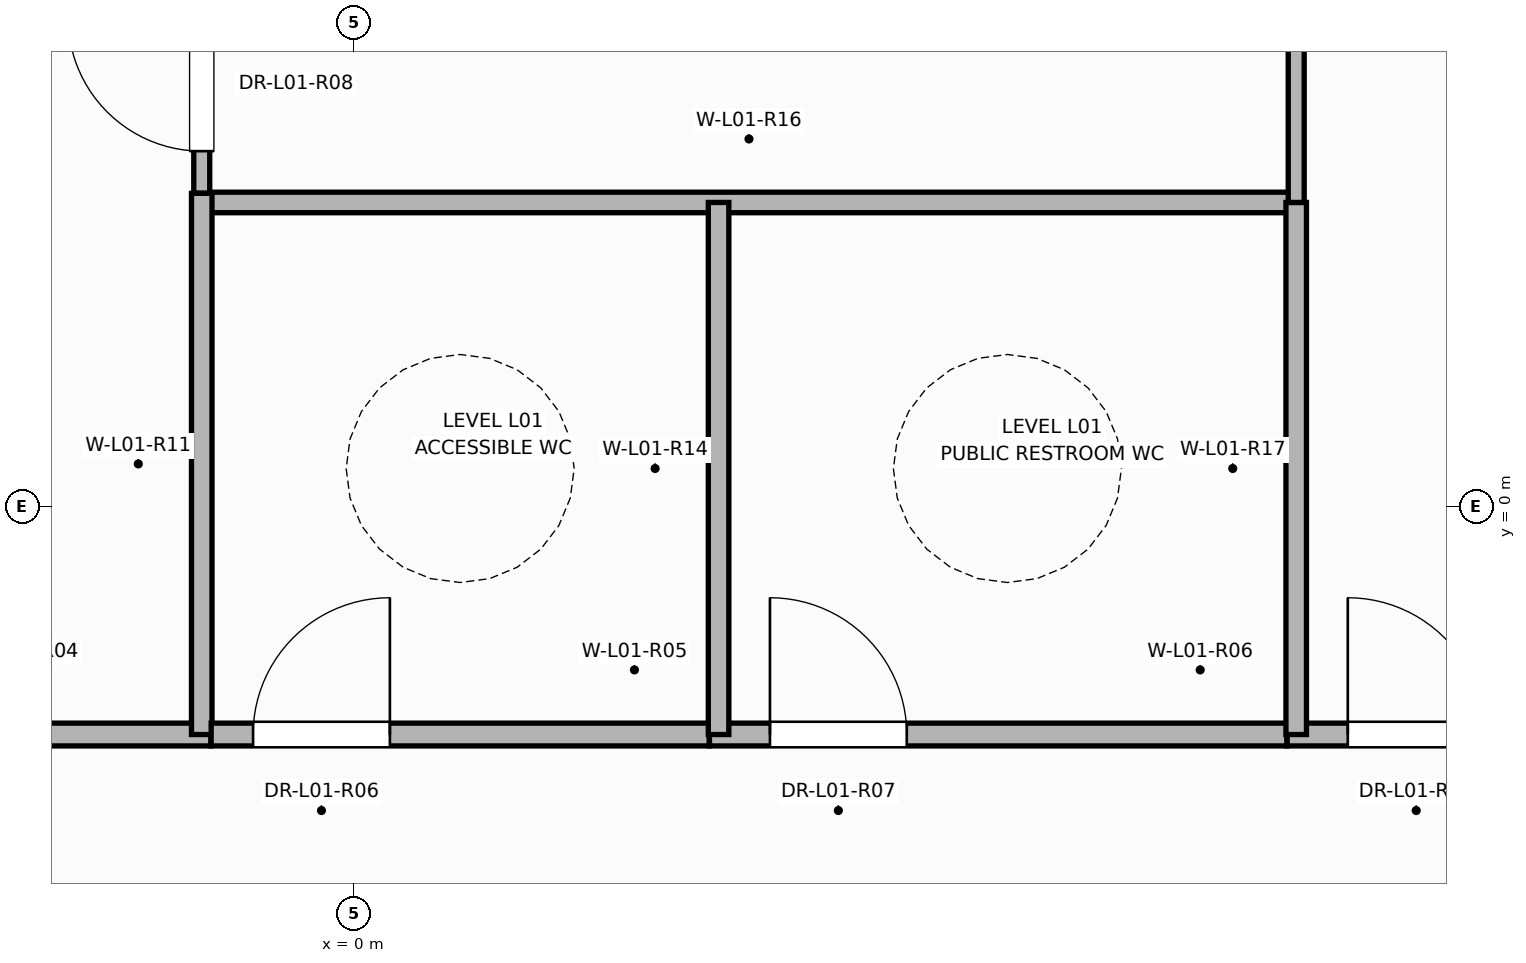
"""IFC4 building model, lengths in metres.
Left out: names, types, materials, properties, quantities, classifications, styles, units other than length and angle.
Written with IfcOpenShell. Run it as: python <this file> out.ifc"""

import sys

from ifc_helpers import new_model, si_unit, direction, frame, frame_2d, origin, place, context, subcontext, project, spatial, rectangle, extrude, element, fill, save


model = new_model("IFC4")
c1 = context("Model", 3, precision=1e-05, world=origin(), true_north=direction((0.0, 1.0)))
c2 = subcontext(c1, "Body", "Model", "MODEL_VIEW")
j1 = project(units=[si_unit("LENGTHUNIT", "METRE"), si_unit("PLANEANGLEUNIT", "RADIAN")], contexts=[c1])
p1 = place(None, origin())
s1 = spatial("IfcSite", under=j1, at=p1, CompositionType="ELEMENT")
p2 = place(p1, origin())
s2 = spatial("IfcBuilding", under=s1, at=p2, CompositionType="ELEMENT")
p3 = place(p2, frame((0.0, 0.0, 5.4)))
s3 = spatial("IfcBuildingStorey", under=s2, at=p3, CompositionType="ELEMENT", Elevation=5.4)
p4 = place(p3, frame((6.14, -1.5, 0.0), z_axis=(0.0, 0.0, 1.0), x_axis=(1.0, 0.0, 0.0)))
e1 = element("IfcWall", 1, at=p4, inside=s3, PredefinedType="PARTITIONING", context=c2, shape_type="SweptSolid", body=[
    extrude(rectangle(XDim=10.177, YDim=0.15, at=frame_2d((5.088, 0.0))), origin(), (0.0, 0.0, 1.0), 4.068),
])
p5 = place(p4, frame((0.399, 0.0, 0.0)))
e2 = element("IfcOpeningElement", 2, at=p5, cuts=e1, PredefinedType="OPENING", context=c2, shape_type="SweptSolid", body=[
    extrude(rectangle(XDim=0.906, YDim=2.104, at=frame_2d((0.45, 1.052))), frame((0.0, 0.085, 0.0), z_axis=(0.0, -1.0, 0.0), x_axis=(1.0, 0.0, 0.0)), (0.0, 0.0, 1.0), 0.17),
])
p6 = place(p3, frame((-9.06, -1.5, 0.0), z_axis=(0.0, 0.0, 1.0), x_axis=(1.0, 0.0, 0.0)))
e3 = element("IfcWall", 3, at=p6, inside=s3, PredefinedType="PARTITIONING", context=c2, shape_type="SweptSolid", body=[
    extrude(rectangle(XDim=8.12, YDim=0.15, at=frame_2d((4.06, 0.0))), origin(), (0.0, 0.0, 1.0), 4.22),
])
p7 = place(p6, frame((0.399, 0.0, 0.0)))
e4 = element("IfcOpeningElement", 4, at=p7, cuts=e3, PredefinedType="OPENING", context=c2, shape_type="SweptSolid", body=[
    extrude(rectangle(XDim=0.906, YDim=2.104, at=frame_2d((0.45, 1.052))), frame((0.0, 0.085, 0.0), z_axis=(0.0, -1.0, 0.0), x_axis=(1.0, 0.0, 0.0)), (0.0, 0.0, 1.0), 0.17),
])
p8 = place(p3, frame((2.34, -1.5, 0.0), z_axis=(0.0, 0.0, 1.0), x_axis=(1.0, 0.0, 0.0)))
e5 = element("IfcWall", 5, at=p8, inside=s3, PredefinedType="PARTITIONING", context=c2, shape_type="SweptSolid", body=[
    extrude(rectangle(XDim=3.798, YDim=0.15, at=frame_2d((1.899, 0.0))), origin(), (0.0, 0.0, 1.0), 4.22),
])
p9 = place(p8, frame((0.398, 0.0, 0.0)))
e6 = element("IfcOpeningElement", 6, at=p9, cuts=e5, PredefinedType="OPENING", context=c2, shape_type="SweptSolid", body=[
    extrude(rectangle(XDim=0.906, YDim=2.104, at=frame_2d((0.45, 1.052))), frame((0.0, 0.085, 0.0), z_axis=(0.0, -1.0, 0.0), x_axis=(1.0, 0.0, 0.0)), (0.0, 0.0, 1.0), 0.17),
])
p10 = place(p3, frame((-1.0, 2.0, 0.0), z_axis=(0.0, 0.0, 1.0), x_axis=(1.0, 0.0, 0.0)))
e7 = element("IfcWall", 7, at=p10, inside=s3, PredefinedType="PARTITIONING", context=c2, shape_type="SweptSolid", body=[
    extrude(rectangle(XDim=7.2, YDim=0.135, at=frame_2d((3.6, 0.0))), origin(), (0.0, 0.0, 1.0), 4.22),
])
p11 = place(p3, frame((-1.0, -1.5, 0.0), z_axis=(0.0, 0.0, 1.0), x_axis=(0.0, 1.0, 0.0)))
e8 = element("IfcWall", 8, at=p11, inside=s3, PredefinedType="PARTITIONING", context=c2, shape_type="SweptSolid", body=[
    extrude(rectangle(XDim=3.56, YDim=0.135, at=frame_2d((1.78, 0.0))), origin(), (0.0, 0.0, 1.0), 4.22),
])
p12 = place(p3, frame((-0.938, -1.5, 0.0), z_axis=(0.0, 0.0, 1.0), x_axis=(1.0, 0.0, 0.0)))
e9 = element("IfcWall", 9, at=p12, inside=s3, PredefinedType="PARTITIONING", context=c2, shape_type="SweptSolid", body=[
    extrude(rectangle(XDim=3.276, YDim=0.15, at=frame_2d((1.638, 0.0))), origin(), (0.0, 0.0, 1.0), 4.22),
])
p13 = place(p12, frame((0.276, 0.0, 0.0)))
e10 = element("IfcOpeningElement", 10, at=p13, cuts=e9, PredefinedType="OPENING", context=c2, shape_type="SweptSolid", body=[
    extrude(rectangle(XDim=0.906, YDim=2.104, at=frame_2d((0.45, 1.052))), frame((0.0, 0.085, 0.0), z_axis=(0.0, -1.0, 0.0), x_axis=(1.0, 0.0, 0.0)), (0.0, 0.0, 1.0), 0.17),
])
for number, where, z_axis, x_axis in (
    (11, (2.4, -1.5, 0.0), (0.0, 0.0, 1.0), (0.0, 1.0, 0.0)),
    (12, (6.2, -1.5, 0.0), (0.0, 0.0, 1.0), (0.0, 1.0, 0.0)),
):
    element("IfcWall", number, at=place(p3, frame(where, z_axis=z_axis, x_axis=x_axis)), inside=s3, PredefinedType="PARTITIONING", context=c2, shape_type="SweptSolid", body=[
        extrude(rectangle(XDim=3.5, YDim=0.135, at=frame_2d((1.75, 0.0))), origin(), (0.0, 0.0, 1.0), 4.22),
    ])
p14 = place(p3, frame((-1.0, 2.062, 0.0), z_axis=(0.0, 0.0, 1.0), x_axis=(0.0, 1.0, 0.0)))
e13 = element("IfcWall", 13, at=p14, inside=s3, PredefinedType="PARTITIONING", context=c2, shape_type="SweptSolid", body=[
    extrude(rectangle(XDim=3.338, YDim=0.105, at=frame_2d((1.669, 0.0))), origin(), (0.0, 0.0, 1.0), 2.995),
])
p15 = place(p14, frame((0.276, 0.0, 0.0)))
e14 = element("IfcOpeningElement", 14, at=p15, cuts=e13, PredefinedType="OPENING", context=c2, shape_type="SweptSolid", body=[
    extrude(rectangle(XDim=0.886, YDim=2.104, at=frame_2d((0.44, 1.052))), frame((0.0, 0.062, 0.0), z_axis=(0.0, -1.0, 0.0), x_axis=(1.0, 0.0, 0.0)), (0.0, 0.0, 1.0), 0.125),
])
p16 = place(p3, frame((6.2, 2.0, 0.0), z_axis=(0.0, 0.0, 1.0), x_axis=(0.0, 1.0, 0.0)))
e15 = element("IfcWall", 15, at=p16, inside=s3, PredefinedType="PARTITIONING", context=c2, shape_type="SweptSolid", body=[
    extrude(rectangle(XDim=3.4, YDim=0.105, at=frame_2d((1.7, 0.0))), origin(), (0.0, 0.0, 1.0), 2.995),
])
p17 = place(p13, origin())
e16 = element("IfcDoor", 16, at=p17, inside=s3, OperationType="SINGLE_SWING_RIGHT", PredefinedType="DOOR", context=c2, shape_type="SweptSolid", body=[
    extrude(rectangle(XDim=0.9, YDim=2.1, at=frame_2d((0.45, 1.05))), frame((0.0, 0.025, 0.0), z_axis=(0.0, -1.0, 0.0), x_axis=(1.0, 0.0, 0.0)), (0.0, 0.0, 1.0), 0.05),
])
fill(e10, e16)
p18 = place(p9, origin())
e17 = element("IfcDoor", 17, at=p18, inside=s3, OperationType="SINGLE_SWING_LEFT", PredefinedType="DOOR", context=c2, shape_type="SweptSolid", body=[
    extrude(rectangle(XDim=0.9, YDim=2.1, at=frame_2d((0.45, 1.05))), frame((0.0, 0.025, 0.0), z_axis=(0.0, -1.0, 0.0), x_axis=(1.0, 0.0, 0.0)), (0.0, 0.0, 1.0), 0.05),
])
fill(e6, e17)
p19 = place(p15, origin())
e18 = element("IfcDoor", 18, at=p19, inside=s3, OperationType="SINGLE_SWING_RIGHT", PredefinedType="DOOR", context=c2, shape_type="SweptSolid", body=[
    extrude(rectangle(XDim=0.88, YDim=2.1, at=frame_2d((0.44, 1.05))), frame((0.0, 0.025, 0.0), z_axis=(0.0, -1.0, 0.0), x_axis=(1.0, 0.0, 0.0)), (0.0, 0.0, 1.0), 0.05),
])
fill(e14, e18)
p20 = place(p5, origin())
e19 = element("IfcDoor", 19, at=p20, inside=s3, OperationType="SINGLE_SWING_LEFT", PredefinedType="DOOR", context=c2, shape_type="SweptSolid", body=[
    extrude(rectangle(XDim=0.9, YDim=2.1, at=frame_2d((0.45, 1.05))), frame((0.0, 0.025, 0.0), z_axis=(0.0, -1.0, 0.0), x_axis=(1.0, 0.0, 0.0)), (0.0, 0.0, 1.0), 0.05),
])
fill(e2, e19)
save(model, sys.argv[1])
